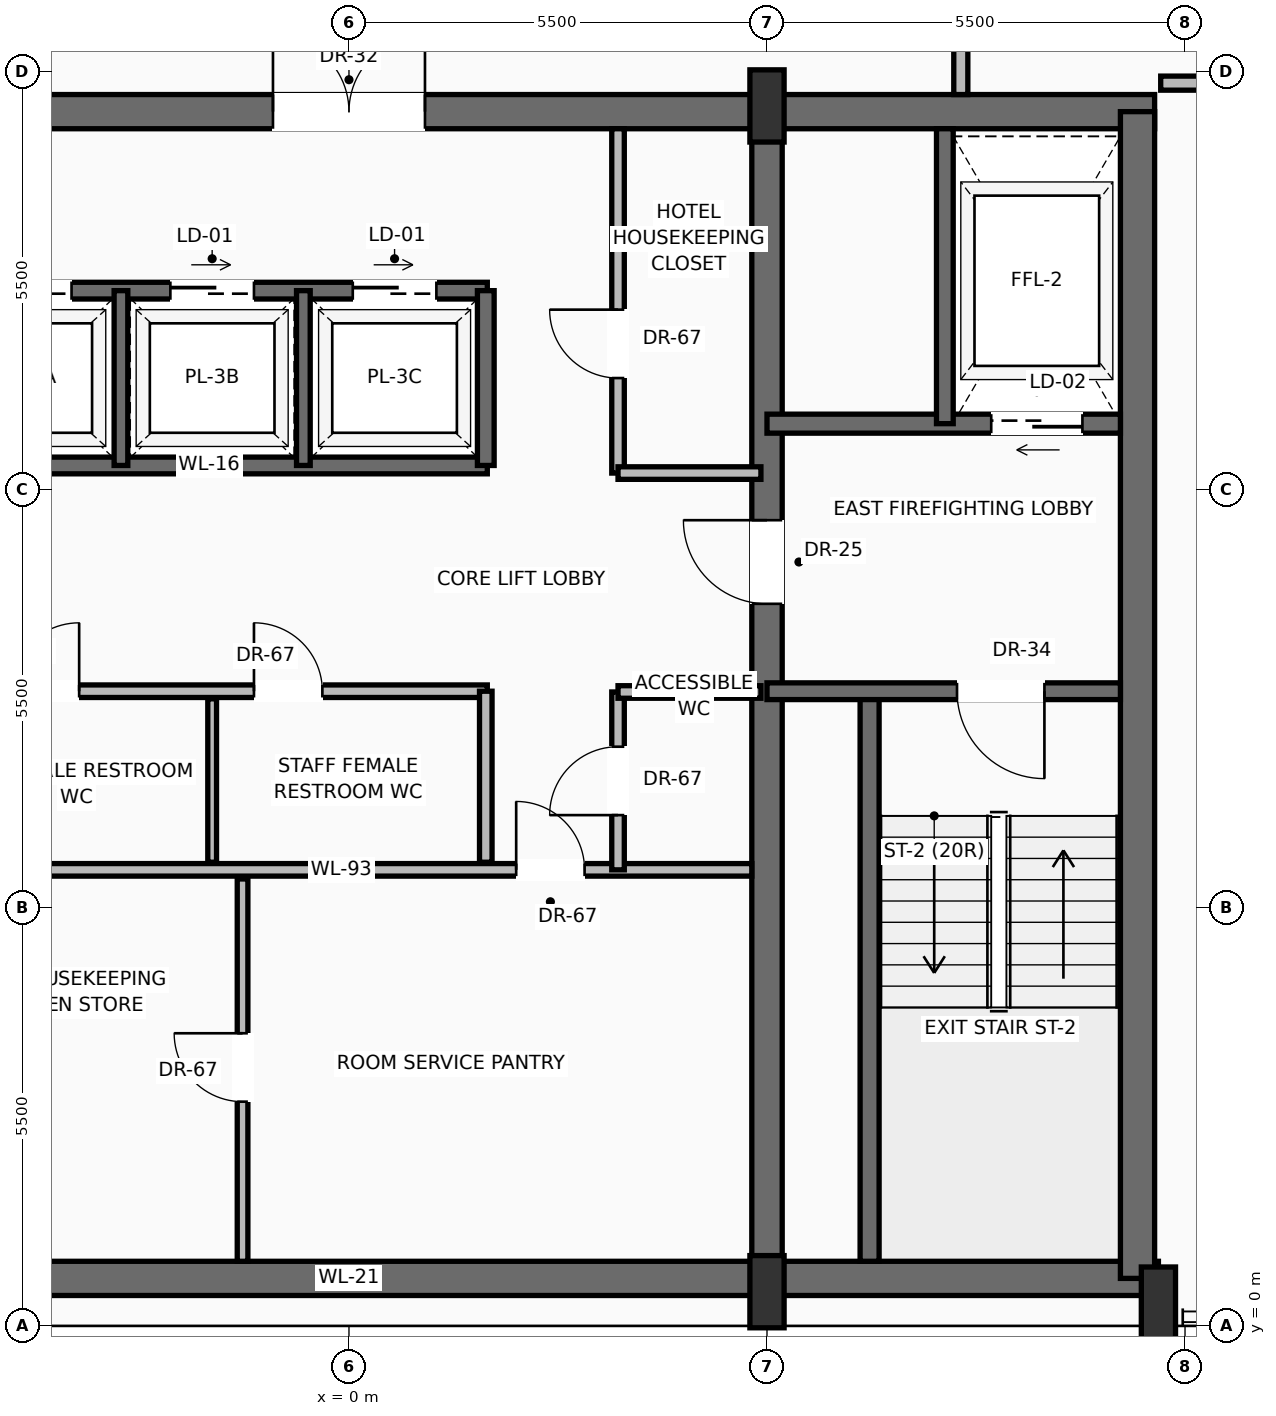
"""IFC4 building model, lengths in metres.
Left out: names, types, materials, properties, quantities, classifications, styles, units other than length and angle.
Written with IfcOpenShell. Run it as: python <this file> out.ifc"""

import sys

from ifc_helpers import new_model, si_unit, direction, frame, frame_2d, origin, origin_2d, place, context, subcontext, project, spatial, rectangle, extrude, source, transform, mapped, element, fill, save


model = new_model("IFC4")
c1 = context("Model", 3, precision=1e-05, world=origin(), true_north=direction((0.0, 1.0)))
c2 = subcontext(c1, "Body", "Model", "MODEL_VIEW")
j1 = project(units=[si_unit("LENGTHUNIT", "METRE"), si_unit("PLANEANGLEUNIT", "RADIAN")], contexts=[c1])
p1 = place(None, origin())
s1 = spatial("IfcSite", under=j1, at=p1, CompositionType="ELEMENT")
p2 = place(p1, origin())
s2 = spatial("IfcBuilding", under=s1, at=p2, CompositionType="ELEMENT")
p3 = place(p2, frame((0.0, 0.0, 269.55)))
s3 = spatial("IfcBuildingStorey", under=s2, at=p3, CompositionType="ELEMENT", Elevation=269.55)
p4 = place(p3, frame((-10.65, 0.625, 0.0), z_axis=(0.0, 0.0, 1.0), x_axis=(1.0, 0.0, 0.0)))
e1 = element("IfcWall", 1, at=p4, inside=s3, PredefinedType="SHEAR", context=c2, shape_type="SweptSolid", body=[
    extrude(rectangle(XDim=21.3, YDim=0.45, at=frame_2d((10.65, 0.0))), origin(), (0.0, 0.0, 1.0), 3.24),
])
p5 = place(p3, frame((-10.6, 15.975, 0.0), z_axis=(0.0, 0.0, 1.0), x_axis=(1.0, 0.0, 0.0)))
e2 = element("IfcWall", 2, at=p5, inside=s3, PredefinedType="SHEAR", context=c2, shape_type="SweptSolid", body=[
    extrude(rectangle(XDim=21.2, YDim=0.45, at=frame_2d((10.6, 0.0))), origin(), (0.0, 0.0, 1.0), 3.24),
])
p6 = place(p5, frame((3.17, 0.0, 0.0)))
e3 = element("IfcOpeningElement", 3, at=p6, cuts=e2, PredefinedType="OPENING", context=c2, shape_type="SweptSolid", body=[
    extrude(rectangle(XDim=1.3, YDim=2.3, at=frame_2d((0.65, 1.15))), frame((0.0, 0.235, 0.0), z_axis=(0.0, -1.0, 0.0), x_axis=(1.0, 0.0, 0.0)), (0.0, 0.0, 1.0), 0.47),
])
p7 = place(p5, frame((9.6, 0.0, 0.0)))
e4 = element("IfcOpeningElement", 4, at=p7, cuts=e2, PredefinedType="OPENING", context=c2, shape_type="SweptSolid", body=[
    extrude(rectangle(XDim=2.0, YDim=2.4, at=frame_2d((1.0, 1.2))), frame((0.0, 0.235, 0.0), z_axis=(0.0, -1.0, 0.0), x_axis=(1.0, 0.0, 0.0)), (0.0, 0.0, 1.0), 0.47),
])
p8 = place(p3, frame((10.375, 0.625, 0.0), z_axis=(0.0, 0.0, 1.0), x_axis=(0.0, 1.0, 0.0)))
e5 = element("IfcWall", 5, at=p8, inside=s3, PredefinedType="SHEAR", context=c2, shape_type="SweptSolid", body=[
    extrude(rectangle(XDim=15.35, YDim=0.45, at=frame_2d((7.675, 0.0))), origin(), (0.0, 0.0, 1.0), 3.24),
])
p9 = place(p3, frame((5.5, 0.625, 0.0), z_axis=(0.0, 0.0, 1.0), x_axis=(0.0, 1.0, 0.0)))
e6 = element("IfcWall", 6, at=p9, inside=s3, PredefinedType="SHEAR", context=c2, shape_type="SweptSolid", body=[
    extrude(rectangle(XDim=15.35, YDim=0.4, at=frame_2d((7.675, 0.0))), origin(), (0.0, 0.0, 1.0), 3.24),
])
p10 = place(p9, frame((8.875, 0.0, 0.0)))
e7 = element("IfcOpeningElement", 7, at=p10, cuts=e6, PredefinedType="OPENING", context=c2, shape_type="SweptSolid", body=[
    extrude(rectangle(XDim=1.1, YDim=2.2, at=frame_2d((0.55, 1.1))), frame((0.0, 0.21, 0.0), z_axis=(0.0, -1.0, 0.0), x_axis=(1.0, 0.0, 0.0)), (0.0, 0.0, 1.0), 0.42),
])
m1 = source(origin(), c2, "Body", "SweptSolid", [
    extrude(rectangle(XDim=0.45, YDim=0.95, at=origin_2d()), origin(), (0.0, 0.0, 1.0), 3.45),
])
for number, where, z_axis, x_axis in (
    (8, (5.5, 0.45, 0.0), (0.0, 0.0, 1.0), (1.0, 0.0, 0.0)),
    (9, (10.65, 0.3, 0.0), (0.0, 0.0, 1.0), (1.0, 0.0, 0.0)),
    (10, (5.5, 16.05, 0.0), (0.0, 0.0, 1.0), (1.0, 0.0, 0.0)),
):
    element("IfcColumn", number, at=place(p3, frame(where, z_axis=z_axis, x_axis=x_axis)), inside=s3, PredefinedType="PILASTER", context=c2, shape_type="MappedRepresentation", body=[
        mapped(m1, transform((0.0, 0.0, 0.0), scale=1.0)),
    ])
p11 = place(p3, frame((7.942, 31.807, 0.0), z_axis=(0.0, 0.0, 1.0), x_axis=(0.513039751496, -0.858364848642, 0.0)))
e11 = element("IfcWall", 11, at=p11, inside=s3, PredefinedType="SOLIDWALL", context=c2, shape_type="SweptSolid", body=[
    extrude(rectangle(XDim=19.959, YDim=0.28, at=frame_2d((9.979, 0.0))), origin(), (0.0, 0.0, 1.0), 2.82),
])
p12 = place(p11, frame((4.79, 0.0, 0.0)))
e12 = element("IfcOpeningElement", 12, at=p12, cuts=e11, PredefinedType="OPENING", context=c2, shape_type="SweptSolid", body=[
    extrude(rectangle(XDim=1.6, YDim=2.35, at=frame_2d((0.8, 1.175))), frame((0.0, 0.15, 0.0), z_axis=(0.0, -1.0, 0.0), x_axis=(1.0, 0.0, 0.0)), (0.0, 0.0, 1.0), 0.3),
])
p13 = place(p11, frame((13.572, 0.0, 0.9)))
e13 = element("IfcOpeningElement", 13, at=p13, cuts=e11, PredefinedType="OPENING", context=c2, shape_type="SweptSolid", body=[
    extrude(rectangle(XDim=2.0, YDim=1.75, at=frame_2d((1.0, 0.875))), frame((0.0, 0.15, 0.0), z_axis=(0.0, -1.0, 0.0), x_axis=(1.0, 0.0, 0.0)), (0.0, 0.0, 1.0), 0.3),
])
p14 = place(p3, frame((6.85, 0.85, 0.0), z_axis=(0.0, 0.0, 1.0), x_axis=(0.0, 1.0, 0.0)))
e14 = element("IfcWall", 14, at=p14, inside=s3, PredefinedType="SOLIDWALL", context=c2, shape_type="SweptSolid", body=[
    extrude(rectangle(XDim=7.5, YDim=0.25, at=frame_2d((3.75, 0.0))), origin(), (0.0, 0.0, 1.0), 3.24),
])
p15 = place(p3, frame((10.15, 8.35, 0.0), z_axis=(0.0, 0.0, 1.0), x_axis=(-1.0, 0.0, 0.0)))
e15 = element("IfcWall", 15, at=p15, inside=s3, PredefinedType="SOLIDWALL", context=c2, shape_type="SweptSolid", body=[
    extrude(rectangle(XDim=4.65, YDim=0.22, at=frame_2d((2.325, 0.0))), origin(), (0.0, 0.0, 1.0), 3.24),
])
p16 = place(p15, frame((1.0, 0.0, 0.0)))
e16 = element("IfcOpeningElement", 16, at=p16, cuts=e15, PredefinedType="OPENING", context=c2, shape_type="SweptSolid", body=[
    extrude(rectangle(XDim=1.15, YDim=2.2, at=frame_2d((0.575, 1.1))), frame((0.0, 0.12, 0.0), z_axis=(0.0, -1.0, 0.0), x_axis=(1.0, 0.0, 0.0)), (0.0, 0.0, 1.0), 0.24),
])
p17 = place(p3, frame((10.15, 11.87, 0.0), z_axis=(0.0, 0.0, 1.0), x_axis=(-1.0, 0.0, 0.0)))
e17 = element("IfcWall", 17, at=p17, inside=s3, PredefinedType="SOLIDWALL", context=c2, shape_type="SweptSolid", body=[
    extrude(rectangle(XDim=4.65, YDim=0.25, at=frame_2d((2.325, 0.0))), origin(), (0.0, 0.0, 1.0), 3.24),
])
p18 = place(p17, frame((0.5, 0.0, 0.0)))
e18 = element("IfcOpeningElement", 18, at=p18, cuts=e17, PredefinedType="OPENING", context=c2, shape_type="SweptSolid", body=[
    extrude(rectangle(XDim=1.2, YDim=2.25, at=frame_2d((0.6, 1.125))), frame((0.0, 0.135, 0.0), z_axis=(0.0, -1.0, 0.0), x_axis=(1.0, 0.0, 0.0)), (0.0, 0.0, 1.0), 0.27),
])
p19 = place(p3, frame((7.84, 11.87, 0.0), z_axis=(0.0, 0.0, 1.0), x_axis=(0.0, 1.0, 0.0)))
e19 = element("IfcWall", 19, at=p19, inside=s3, PredefinedType="SOLIDWALL", context=c2, shape_type="SweptSolid", body=[
    extrude(rectangle(XDim=3.88, YDim=0.22, at=frame_2d((1.94, 0.0))), origin(), (0.0, 0.0, 1.0), 3.24),
])
p20 = place(p3, frame((-5.5, 6.0, 0.0), z_axis=(0.0, 0.0, 1.0), x_axis=(1.0, 0.0, 0.0)))
e20 = element("IfcWall", 20, at=p20, inside=s3, PredefinedType="PARTITIONING", context=c2, shape_type="SweptSolid", body=[
    extrude(rectangle(XDim=10.8, YDim=0.165, at=frame_2d((5.4, 0.0))), origin(), (0.0, 0.0, 1.0), 3.232),
])
p21 = place(p20, frame((7.7, 0.0, 0.0)))
e21 = element("IfcOpeningElement", 21, at=p21, cuts=e20, PredefinedType="OPENING", context=c2, shape_type="SweptSolid", body=[
    extrude(rectangle(XDim=0.9, YDim=2.1, at=frame_2d((0.45, 1.05))), frame((0.0, 0.093, 0.0), z_axis=(0.0, -1.0, 0.0), x_axis=(1.0, 0.0, 0.0)), (0.0, 0.0, 1.0), 0.185),
])
p22 = place(p3, frame((-1.4, 0.85, 0.0), z_axis=(0.0, 0.0, 1.0), x_axis=(0.0, 1.0, 0.0)))
e22 = element("IfcWall", 22, at=p22, inside=s3, PredefinedType="PARTITIONING", context=c2, shape_type="SweptSolid", body=[
    extrude(rectangle(XDim=5.03, YDim=0.14, at=frame_2d((2.515, 0.0))), origin(), (0.0, 0.0, 1.0), 3.232),
])
p23 = place(p22, frame((2.1, 0.0, 0.0)))
e23 = element("IfcOpeningElement", 23, at=p23, cuts=e22, PredefinedType="OPENING", context=c2, shape_type="SweptSolid", body=[
    extrude(rectangle(XDim=0.9, YDim=2.1, at=frame_2d((0.45, 1.05))), frame((0.0, 0.08, 0.0), z_axis=(0.0, -1.0, 0.0), x_axis=(1.0, 0.0, 0.0)), (0.0, 0.0, 1.0), 0.16),
])
p24 = place(p3, frame((3.54, 6.0, 0.0), z_axis=(0.0, 0.0, 1.0), x_axis=(0.0, 1.0, 0.0)))
e24 = element("IfcWall", 24, at=p24, inside=s3, PredefinedType="PARTITIONING", context=c2, shape_type="SweptSolid", body=[
    extrude(rectangle(XDim=2.34, YDim=0.165, at=frame_2d((1.17, 0.0))), origin(), (0.0, 0.0, 1.0), 3.232),
])
p25 = place(p24, frame((0.72, 0.0, 0.0)))
e25 = element("IfcOpeningElement", 25, at=p25, cuts=e24, PredefinedType="OPENING", context=c2, shape_type="SweptSolid", body=[
    extrude(rectangle(XDim=0.9, YDim=2.1, at=frame_2d((0.45, 1.05))), frame((0.0, 0.093, 0.0), z_axis=(0.0, -1.0, 0.0), x_axis=(1.0, 0.0, 0.0)), (0.0, 0.0, 1.0), 0.185),
])
p26 = place(p3, frame((3.54, 8.34, 0.0), z_axis=(0.0, 0.0, 1.0), x_axis=(1.0, 0.0, 0.0)))
e26 = element("IfcWall", 26, at=p26, inside=s3, PredefinedType="PARTITIONING", context=c2, shape_type="SweptSolid", body=[
    extrude(rectangle(XDim=1.88, YDim=0.165, at=frame_2d((0.94, 0.0))), origin(), (0.0, 0.0, 1.0), 3.232),
])
p27 = place(p3, frame((-5.3, 8.35, 0.0), z_axis=(0.0, 0.0, 1.0), x_axis=(1.0, 0.0, 0.0)))
e27 = element("IfcWall", 27, at=p27, inside=s3, PredefinedType="PARTITIONING", context=c2, shape_type="SweptSolid", body=[
    extrude(rectangle(XDim=7.12, YDim=0.165, at=frame_2d((3.56, 0.0))), origin(), (0.0, 0.0, 1.0), 3.232),
])
p28 = place(p27, frame((0.85, 0.0, 0.0)))
e28 = element("IfcOpeningElement", 28, at=p28, cuts=e27, PredefinedType="OPENING", context=c2, shape_type="SweptSolid", body=[
    extrude(rectangle(XDim=0.9, YDim=2.1, at=frame_2d((0.45, 1.05))), frame((0.0, 0.093, 0.0), z_axis=(0.0, -1.0, 0.0), x_axis=(1.0, 0.0, 0.0)), (0.0, 0.0, 1.0), 0.185),
])
p29 = place(p27, frame((4.05, 0.0, 0.0)))
e29 = element("IfcOpeningElement", 29, at=p29, cuts=e27, PredefinedType="OPENING", context=c2, shape_type="SweptSolid", body=[
    extrude(rectangle(XDim=0.9, YDim=2.1, at=frame_2d((0.45, 1.05))), frame((0.0, 0.093, 0.0), z_axis=(0.0, -1.0, 0.0), x_axis=(1.0, 0.0, 0.0)), (0.0, 0.0, 1.0), 0.185),
])
p30 = place(p3, frame((1.8, 6.1, 0.0), z_axis=(0.0, 0.0, 1.0), x_axis=(0.0, 1.0, 0.0)))
e30 = element("IfcWall", 30, at=p30, inside=s3, PredefinedType="PARTITIONING", context=c2, shape_type="SweptSolid", body=[
    extrude(rectangle(XDim=2.25, YDim=0.165, at=frame_2d((1.125, 0.0))), origin(), (0.0, 0.0, 1.0), 3.232),
])
p31 = place(p3, frame((-1.8, 6.1, 0.0), z_axis=(0.0, 0.0, 1.0), x_axis=(0.0, 1.0, 0.0)))
e31 = element("IfcWall", 31, at=p31, inside=s3, PredefinedType="PARTITIONING", context=c2, shape_type="SweptSolid", body=[
    extrude(rectangle(XDim=2.15, YDim=0.115, at=frame_2d((1.075, 0.0))), origin(), (0.0, 0.0, 1.0), 3.232),
])
p32 = place(p3, frame((-5.5, 11.32, 0.0), z_axis=(0.0, 0.0, 1.0), x_axis=(1.0, 0.0, 0.0)))
e32 = element("IfcWall", 32, at=p32, inside=s3, PredefinedType="SOLIDWALL", context=c2, shape_type="SweptSolid", body=[
    extrude(rectangle(XDim=7.32, YDim=0.22, at=frame_2d((3.66, 0.0))), origin(), (0.0, 0.0, 1.0), 3.24),
])
p33 = place(p3, frame((-5.5, 13.62, 0.0), z_axis=(0.0, 0.0, 1.0), x_axis=(1.0, 0.0, 0.0)))
e33 = element("IfcWall", 33, at=p33, inside=s3, PredefinedType="SOLIDWALL", context=c2, shape_type="SweptSolid", body=[
    extrude(rectangle(XDim=7.32, YDim=0.22, at=frame_2d((3.66, 0.0))), origin(), (0.0, 0.0, 1.0), 3.24),
])
p34 = place(p33, frame((0.75, 0.0, 0.0)))
e34 = element("IfcOpeningElement", 34, at=p34, cuts=e33, PredefinedType="OPENING", context=c2, shape_type="SweptSolid", body=[
    extrude(rectangle(XDim=1.1, YDim=2.2, at=frame_2d((0.55, 1.1))), frame((0.0, 0.12, 0.0), z_axis=(0.0, -1.0, 0.0), x_axis=(1.0, 0.0, 0.0)), (0.0, 0.0, 1.0), 0.24),
])
p35 = place(p33, frame((3.15, 0.0, 0.0)))
e35 = element("IfcOpeningElement", 35, at=p35, cuts=e33, PredefinedType="OPENING", context=c2, shape_type="SweptSolid", body=[
    extrude(rectangle(XDim=1.1, YDim=2.2, at=frame_2d((0.55, 1.1))), frame((0.0, 0.12, 0.0), z_axis=(0.0, -1.0, 0.0), x_axis=(1.0, 0.0, 0.0)), (0.0, 0.0, 1.0), 0.24),
])
p36 = place(p33, frame((5.55, 0.0, 0.0)))
e36 = element("IfcOpeningElement", 36, at=p36, cuts=e33, PredefinedType="OPENING", context=c2, shape_type="SweptSolid", body=[
    extrude(rectangle(XDim=1.1, YDim=2.2, at=frame_2d((0.55, 1.1))), frame((0.0, 0.12, 0.0), z_axis=(0.0, -1.0, 0.0), x_axis=(1.0, 0.0, 0.0)), (0.0, 0.0, 1.0), 0.24),
])
p37 = place(p3, frame((1.8, 11.32, 0.0), z_axis=(0.0, 0.0, 1.0), x_axis=(0.0, 1.0, 0.0)))
e37 = element("IfcWall", 37, at=p37, inside=s3, PredefinedType="SOLIDWALL", context=c2, shape_type="SweptSolid", body=[
    extrude(rectangle(XDim=2.3, YDim=0.22, at=frame_2d((1.15, 0.0))), origin(), (0.0, 0.0, 1.0), 3.24),
])
for number, where, z_axis, x_axis in (
    (38, (-3.0, 11.32, 0.0), (0.0, 0.0, 1.0), (0.0, 1.0, 0.0)),
    (39, (-0.6, 11.32, 0.0), (0.0, 0.0, 1.0), (0.0, 1.0, 0.0)),
):
    element("IfcWall", number, at=place(p3, frame(where, z_axis=z_axis, x_axis=x_axis)), inside=s3, PredefinedType="SOLIDWALL", context=c2, shape_type="SweptSolid", body=[
        extrude(rectangle(XDim=2.3, YDim=0.18, at=frame_2d((1.15, 0.0))), origin(), (0.0, 0.0, 1.0), 3.24),
    ])
p38 = place(p3, frame((3.54, 11.22, 0.0), z_axis=(0.0, 0.0, 1.0), x_axis=(0.0, 1.0, 0.0)))
e40 = element("IfcWall", 40, at=p38, inside=s3, PredefinedType="PARTITIONING", context=c2, shape_type="SweptSolid", body=[
    extrude(rectangle(XDim=4.53, YDim=0.165, at=frame_2d((2.265, 0.0))), origin(), (0.0, 0.0, 1.0), 3.232),
])
p39 = place(p38, frame((1.25, 0.0, 0.0)))
e41 = element("IfcOpeningElement", 41, at=p39, cuts=e40, PredefinedType="OPENING", context=c2, shape_type="SweptSolid", body=[
    extrude(rectangle(XDim=0.9, YDim=2.1, at=frame_2d((0.45, 1.05))), frame((0.0, 0.093, 0.0), z_axis=(0.0, -1.0, 0.0), x_axis=(1.0, 0.0, 0.0)), (0.0, 0.0, 1.0), 0.185),
])
p40 = place(p3, frame((3.54, 11.22, 0.0), z_axis=(0.0, 0.0, 1.0), x_axis=(1.0, 0.0, 0.0)))
e42 = element("IfcWall", 42, at=p40, inside=s3, PredefinedType="PARTITIONING", context=c2, shape_type="SweptSolid", body=[
    extrude(rectangle(XDim=1.88, YDim=0.165, at=frame_2d((0.94, 0.0))), origin(), (0.0, 0.0, 1.0), 3.232),
])
p41 = place(p3, frame((8.05, 16.2, 0.0), z_axis=(0.0, 0.0, 1.0), x_axis=(0.0, 1.0, 0.0)))
e43 = element("IfcWall", 43, at=p41, inside=s3, PredefinedType="PARTITIONING", context=c2, shape_type="SweptSolid", body=[
    extrude(rectangle(XDim=13.8, YDim=0.185, at=frame_2d((6.9, 0.0))), origin(), (0.0, 0.0, 1.0), 3.232),
])
p42 = place(p41, frame((3.238, 0.0, 0.0)))
e44 = element("IfcOpeningElement", 44, at=p42, cuts=e43, PredefinedType="OPENING", context=c2, shape_type="SweptSolid", body=[
    extrude(rectangle(XDim=1.05, YDim=2.25, at=frame_2d((0.525, 1.125))), frame((0.0, 0.103, 0.0), z_axis=(0.0, -1.0, 0.0), x_axis=(1.0, 0.0, 0.0)), (0.0, 0.0, 1.0), 0.205),
])
p43 = place(p3, frame((10.68, 16.35, 0.0), z_axis=(0.0, 0.0, 1.0), x_axis=(1.0, 0.0, 0.0)))
e45 = element("IfcWall", 45, at=p43, inside=s3, PredefinedType="PARTITIONING", context=c2, shape_type="SweptSolid", body=[
    extrude(rectangle(XDim=6.652, YDim=0.185, at=frame_2d((3.326, 0.0))), origin(), (0.0, 0.0, 1.0), 3.232),
])
p44 = place(p43, frame((1.905, 0.0, 0.0)))
e46 = element("IfcOpeningElement", 46, at=p44, cuts=e45, PredefinedType="OPENING", context=c2, shape_type="SweptSolid", body=[
    extrude(rectangle(XDim=1.05, YDim=2.25, at=frame_2d((0.525, 1.125))), frame((0.0, 0.103, 0.0), z_axis=(0.0, -1.0, 0.0), x_axis=(1.0, 0.0, 0.0)), (0.0, 0.0, 1.0), 0.205),
])
m2 = source(origin(), c2, "Body", "SweptSolid", [
    extrude(rectangle(XDim=1.15, YDim=2.2, at=frame_2d((0.575, 1.1))), frame((0.0, 0.025, 0.0), z_axis=(0.0, -1.0, 0.0), x_axis=(1.0, 0.0, 0.0)), (0.0, 0.0, 1.0), 0.05),
])
p45 = place(p16, origin())
e47 = element("IfcDoor", 47, at=p45, inside=s3, OperationType="SINGLE_SWING_LEFT", PredefinedType="DOOR", context=c2, shape_type="MappedRepresentation", body=[
    mapped(m2, transform((0.0, 0.0, 0.0), scale=1.0)),
])
fill(e16, e47)
m3 = source(origin(), c2, "Body", "SweptSolid", [
    extrude(rectangle(XDim=1.1, YDim=2.2, at=frame_2d((0.55, 1.1))), frame((0.0, 0.025, 0.0), z_axis=(0.0, -1.0, 0.0), x_axis=(1.0, 0.0, 0.0)), (0.0, 0.0, 1.0), 0.05),
])
p46 = place(p10, origin())
e48 = element("IfcDoor", 48, at=p46, inside=s3, OperationType="SINGLE_SWING_RIGHT", PredefinedType="DOOR", context=c2, shape_type="MappedRepresentation", body=[
    mapped(m3, transform((0.0, 0.0, 0.0), scale=1.0)),
])
fill(e7, e48)
m4 = source(origin(), c2, "Body", "SweptSolid", [
    extrude(rectangle(XDim=1.2, YDim=2.25, at=frame_2d((0.6, 1.125))), frame((0.0, 0.025, 0.0), z_axis=(0.0, -1.0, 0.0), x_axis=(1.0, 0.0, 0.0)), (0.0, 0.0, 1.0), 0.05),
])
p47 = place(p18, origin())
e49 = element("IfcDoor", 49, at=p47, inside=s3, OperationType="SLIDING_TO_RIGHT", PredefinedType="DOOR", context=c2, shape_type="MappedRepresentation", body=[
    mapped(m4, transform((0.0, 0.0, 0.0), scale=1.0)),
])
fill(e18, e49)
m5 = source(origin(), c2, "Body", "SweptSolid", [
    extrude(rectangle(XDim=2.0, YDim=2.4, at=frame_2d((1.0, 1.2))), frame((0.0, 0.025, 0.0), z_axis=(0.0, -1.0, 0.0), x_axis=(1.0, 0.0, 0.0)), (0.0, 0.0, 1.0), 0.05),
])
p48 = place(p7, origin())
e50 = element("IfcDoor", 50, at=p48, inside=s3, OperationType="DOUBLE_DOOR_SINGLE_SWING", PredefinedType="DOOR", context=c2, shape_type="MappedRepresentation", body=[
    mapped(m5, transform((0.0, 0.0, 0.0), scale=1.0)),
])
fill(e4, e50)
m6 = source(origin(), c2, "Body", "SweptSolid", [
    extrude(rectangle(XDim=0.9, YDim=2.1, at=frame_2d((0.45, 1.05))), frame((0.0, 0.025, 0.0), z_axis=(0.0, -1.0, 0.0), x_axis=(1.0, 0.0, 0.0)), (0.0, 0.0, 1.0), 0.05),
])
p49 = place(p21, origin())
e51 = element("IfcDoor", 51, at=p49, inside=s3, OperationType="SINGLE_SWING_LEFT", PredefinedType="DOOR", context=c2, shape_type="MappedRepresentation", body=[
    mapped(m6, transform((0.0, 0.0, 0.0), scale=1.0)),
])
fill(e21, e51)
p50 = place(p23, origin())
e52 = element("IfcDoor", 52, at=p50, inside=s3, OperationType="SINGLE_SWING_RIGHT", PredefinedType="DOOR", context=c2, shape_type="MappedRepresentation", body=[
    mapped(m6, transform((0.0, 0.0, 0.0), scale=1.0)),
])
fill(e23, e52)
p51 = place(p25, origin())
e53 = element("IfcDoor", 53, at=p51, inside=s3, OperationType="SINGLE_SWING_LEFT", PredefinedType="DOOR", context=c2, shape_type="MappedRepresentation", body=[
    mapped(m6, transform((0.0, 0.0, 0.0), scale=1.0)),
])
fill(e25, e53)
p52 = place(p28, origin())
e54 = element("IfcDoor", 54, at=p52, inside=s3, OperationType="SINGLE_SWING_RIGHT", PredefinedType="DOOR", context=c2, shape_type="MappedRepresentation", body=[
    mapped(m6, transform((0.0, 0.0, 0.0), scale=1.0)),
])
fill(e28, e54)
p53 = place(p29, origin())
e55 = element("IfcDoor", 55, at=p53, inside=s3, OperationType="SINGLE_SWING_LEFT", PredefinedType="DOOR", context=c2, shape_type="MappedRepresentation", body=[
    mapped(m6, transform((0.0, 0.0, 0.0), scale=1.0)),
])
fill(e29, e55)
m7 = source(origin(), c2, "Body", "SweptSolid", [
    extrude(rectangle(XDim=1.1, YDim=2.2, at=frame_2d((0.55, 1.1))), frame((0.0, 0.025, 0.0), z_axis=(0.0, -1.0, 0.0), x_axis=(1.0, 0.0, 0.0)), (0.0, 0.0, 1.0), 0.05),
])
p54 = place(p34, origin())
e56 = element("IfcDoor", 56, at=p54, inside=s3, OperationType="SLIDING_TO_RIGHT", PredefinedType="DOOR", context=c2, shape_type="MappedRepresentation", body=[
    mapped(m7, transform((0.0, 0.0, 0.0), scale=1.0)),
])
fill(e34, e56)
p55 = place(p35, origin())
e57 = element("IfcDoor", 57, at=p55, inside=s3, OperationType="SLIDING_TO_RIGHT", PredefinedType="DOOR", context=c2, shape_type="MappedRepresentation", body=[
    mapped(m7, transform((0.0, 0.0, 0.0), scale=1.0)),
])
fill(e35, e57)
p56 = place(p36, origin())
e58 = element("IfcDoor", 58, at=p56, inside=s3, OperationType="SLIDING_TO_RIGHT", PredefinedType="DOOR", context=c2, shape_type="MappedRepresentation", body=[
    mapped(m7, transform((0.0, 0.0, 0.0), scale=1.0)),
])
fill(e36, e58)
p57 = place(p39, origin())
e59 = element("IfcDoor", 59, at=p57, inside=s3, OperationType="SINGLE_SWING_RIGHT", PredefinedType="DOOR", context=c2, shape_type="MappedRepresentation", body=[
    mapped(m6, transform((0.0, 0.0, 0.0), scale=1.0)),
])
fill(e41, e59)
save(model, sys.argv[1])
